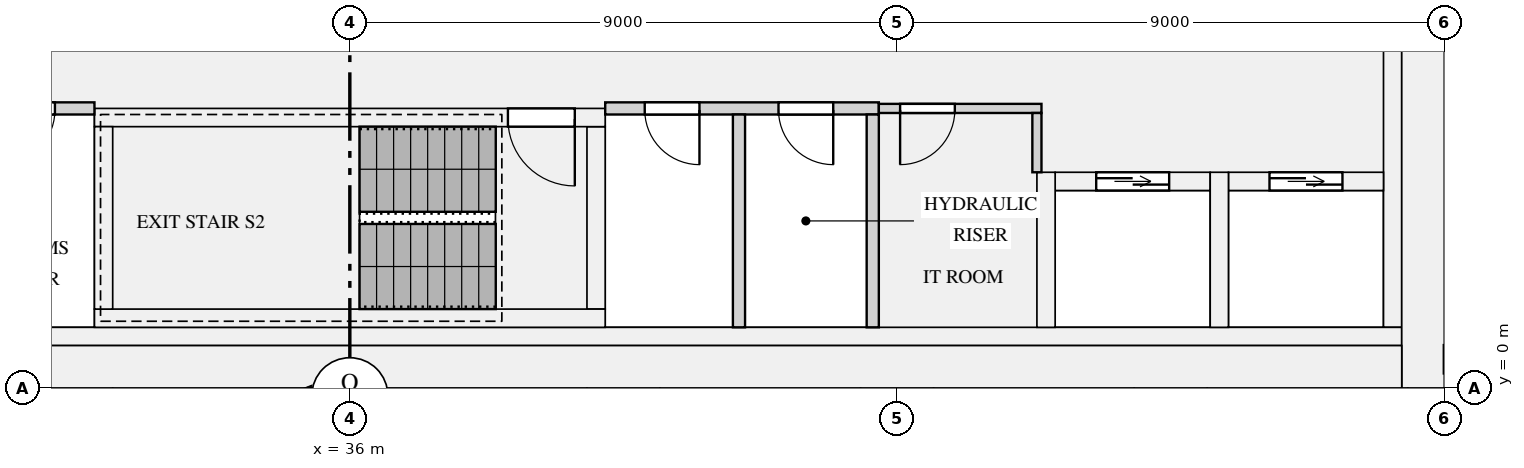
"""IFC4 building model, lengths in metres.
Left out: names, types, materials, properties, quantities, classifications, styles, units other than length and angle.
Written with IfcOpenShell. Run it as: python <this file> out.ifc"""

import sys

from ifc_helpers import new_model, si_unit, direction, frame, frame_2d, origin, place, context, subcontext, project, spatial, rectangle, extrude, element, fill, save


model = new_model("IFC4")
c1 = context("Model", 3, precision=1e-05, world=origin(), true_north=direction((0.0, 1.0)))
c2 = subcontext(c1, "Body", "Model", "MODEL_VIEW")
j1 = project(units=[si_unit("LENGTHUNIT", "METRE"), si_unit("PLANEANGLEUNIT", "RADIAN")], contexts=[c1])
p1 = place(None, origin())
s1 = spatial("IfcSite", under=j1, at=p1, CompositionType="ELEMENT")
p2 = place(p1, origin())
s2 = spatial("IfcBuilding", under=s1, at=p2, CompositionType="ELEMENT")
p3 = place(p2, frame((0.0, 0.0, 160.2)))
s3 = spatial("IfcBuildingStorey", under=s2, at=p3, CompositionType="ELEMENT", Elevation=160.2)
p4 = place(p3, frame((53.65, 0.0, 0.0), z_axis=(0.0, 0.0, 1.0), x_axis=(0.0, 1.0, 0.0)))
e1 = element("IfcWall", 1, at=p4, inside=s3, PredefinedType="SHEAR", context=c2, shape_type="SweptSolid", body=[
    extrude(rectangle(XDim=12.5, YDim=0.7, at=frame_2d((6.25, 0.0))), origin(), (0.0, 0.0, 1.0), 3.15),
])
p5 = place(p3, frame((18.7, 0.35, 0.0), z_axis=(0.0, 0.0, 1.0), x_axis=(1.0, 0.0, 0.0)))
e2 = element("IfcWall", 2, at=p5, inside=s3, PredefinedType="SHEAR", context=c2, shape_type="SweptSolid", body=[
    extrude(rectangle(XDim=34.6, YDim=0.7, at=frame_2d((17.3, 0.0))), origin(), (0.0, 0.0, 1.0), 3.15),
])
p6 = place(p3, frame((53.15, 1.0, 0.0), z_axis=(0.0, 0.0, 1.0), x_axis=(0.0, 1.0, 0.0)))
e3 = element("IfcWall", 3, at=p6, inside=s3, PredefinedType="SHEAR", context=c2, shape_type="SweptSolid", body=[
    extrude(rectangle(XDim=10.9, YDim=0.3, at=frame_2d((5.45, 0.0))), origin(), (0.0, 0.0, 1.0), 3.15),
])
p7 = place(p3, frame((18.7, 0.85, 0.0), z_axis=(0.0, 0.0, 1.0), x_axis=(1.0, 0.0, 0.0)))
e4 = element("IfcWall", 4, at=p7, inside=s3, PredefinedType="SHEAR", context=c2, shape_type="SweptSolid", body=[
    extrude(rectangle(XDim=34.6, YDim=0.3, at=frame_2d((17.3, 0.0))), origin(), (0.0, 0.0, 1.0), 3.15),
])
p8 = place(p3, frame((47.6, 3.4, 0.0), z_axis=(0.0, 0.0, 1.0), x_axis=(1.0, 0.0, 0.0)))
e5 = element("IfcWall", 5, at=p8, inside=s3, PredefinedType="SHEAR", context=c2, shape_type="SweptSolid", body=[
    extrude(rectangle(XDim=2.55, YDim=0.3, at=frame_2d((1.275, 0.0))), origin(), (0.0, 0.0, 1.0), 3.15),
])
p9 = place(p8, frame((0.675, 0.0, 0.0)))
e6 = element("IfcOpeningElement", 6, at=p9, cuts=e5, PredefinedType="OPENING", context=c2, shape_type="SweptSolid", body=[
    extrude(rectangle(XDim=1.2, YDim=2.1, at=frame_2d((0.6, 1.05))), frame((0.0, 0.16, 0.0), z_axis=(0.0, -1.0, 0.0), x_axis=(1.0, 0.0, 0.0)), (0.0, 0.0, 1.0), 0.32),
])
p10 = place(p3, frame((47.45, 1.0, 0.0), z_axis=(0.0, 0.0, 1.0), x_axis=(0.0, 1.0, 0.0)))
e7 = element("IfcWall", 7, at=p10, inside=s3, PredefinedType="SHEAR", context=c2, shape_type="SweptSolid", body=[
    extrude(rectangle(XDim=2.55, YDim=0.3, at=frame_2d((1.275, 0.0))), origin(), (0.0, 0.0, 1.0), 3.15),
])
p11 = place(p3, frame((50.45, 3.4, 0.0), z_axis=(0.0, 0.0, 1.0), x_axis=(1.0, 0.0, 0.0)))
e8 = element("IfcWall", 8, at=p11, inside=s3, PredefinedType="SHEAR", context=c2, shape_type="SweptSolid", body=[
    extrude(rectangle(XDim=2.55, YDim=0.3, at=frame_2d((1.275, 0.0))), origin(), (0.0, 0.0, 1.0), 3.15),
])
p12 = place(p11, frame((0.675, 0.0, 0.0)))
e9 = element("IfcOpeningElement", 9, at=p12, cuts=e8, PredefinedType="OPENING", context=c2, shape_type="SweptSolid", body=[
    extrude(rectangle(XDim=1.2, YDim=2.1, at=frame_2d((0.6, 1.05))), frame((0.0, 0.16, 0.0), z_axis=(0.0, -1.0, 0.0), x_axis=(1.0, 0.0, 0.0)), (0.0, 0.0, 1.0), 0.32),
])
p13 = place(p3, frame((50.3, 1.0, 0.0), z_axis=(0.0, 0.0, 1.0), x_axis=(0.0, 1.0, 0.0)))
e10 = element("IfcWall", 10, at=p13, inside=s3, PredefinedType="SHEAR", context=c2, shape_type="SweptSolid", body=[
    extrude(rectangle(XDim=2.55, YDim=0.3, at=frame_2d((1.275, 0.0))), origin(), (0.0, 0.0, 1.0), 3.15),
])
p14 = place(p3, frame((31.8, 1.15, 0.0), z_axis=(0.0, 0.0, 1.0), x_axis=(1.0, 0.0, 0.0)))
e11 = element("IfcWall", 11, at=p14, inside=s3, PredefinedType="SHEAR", context=c2, shape_type="SweptSolid", body=[
    extrude(rectangle(XDim=8.4, YDim=0.3, at=frame_2d((4.2, 0.0))), origin(), (0.0, 0.0, 1.0), 3.15),
])
p15 = place(p3, frame((31.8, 4.45, 0.0), z_axis=(0.0, 0.0, 1.0), x_axis=(1.0, 0.0, 0.0)))
e12 = element("IfcWall", 12, at=p15, inside=s3, PredefinedType="SHEAR", context=c2, shape_type="SweptSolid", body=[
    extrude(rectangle(XDim=8.4, YDim=0.3, at=frame_2d((4.2, 0.0))), origin(), (0.0, 0.0, 1.0), 3.15),
])
p16 = place(p15, frame((6.8, 0.0, 0.0)))
e13 = element("IfcOpeningElement", 13, at=p16, cuts=e12, PredefinedType="OPENING", context=c2, shape_type="SweptSolid", body=[
    extrude(rectangle(XDim=1.1, YDim=2.1, at=frame_2d((0.55, 1.05))), frame((0.0, 0.16, 0.0), z_axis=(0.0, -1.0, 0.0), x_axis=(1.0, 0.0, 0.0)), (0.0, 0.0, 1.0), 0.32),
])
for number, where, z_axis, x_axis in (
    (14, (31.95, 1.3, 0.0), (0.0, 0.0, 1.0), (0.0, 1.0, 0.0)),
    (15, (40.05, 1.3, 0.0), (0.0, 0.0, 1.0), (0.0, 1.0, 0.0)),
):
    element("IfcWall", number, at=place(p3, frame(where, z_axis=z_axis, x_axis=x_axis)), inside=s3, PredefinedType="SHEAR", context=c2, shape_type="SweptSolid", body=[
        extrude(rectangle(XDim=3.0, YDim=0.3, at=frame_2d((1.5, 0.0))), origin(), (0.0, 0.0, 1.0), 3.15),
    ])
p17 = place(p3, frame((27.3, 4.6, 0.0), z_axis=(0.0, 0.0, 1.0), x_axis=(1.0, 0.0, 0.0)))
e16 = element("IfcWall", 16, at=p17, inside=s3, PredefinedType="PARTITIONING", context=c2, shape_type="SweptSolid", body=[
    extrude(rectangle(XDim=4.5, YDim=0.2, at=frame_2d((2.25, 0.0))), origin(), (0.0, 0.0, 1.0), 2.83),
])
p18 = place(p17, frame((0.75, 0.0, 0.0)))
e17 = element("IfcOpeningElement", 17, at=p18, cuts=e16, PredefinedType="OPENING", context=c2, shape_type="SweptSolid", body=[
    extrude(rectangle(XDim=0.9, YDim=2.1, at=frame_2d((0.45, 1.05))), frame((0.0, 0.11, 0.0), z_axis=(0.0, -1.0, 0.0), x_axis=(1.0, 0.0, 0.0)), (0.0, 0.0, 1.0), 0.22),
])
p19 = place(p17, frame((2.95, 0.0, 0.0)))
e18 = element("IfcOpeningElement", 18, at=p19, cuts=e16, PredefinedType="OPENING", context=c2, shape_type="SweptSolid", body=[
    extrude(rectangle(XDim=0.9, YDim=2.1, at=frame_2d((0.45, 1.05))), frame((0.0, 0.11, 0.0), z_axis=(0.0, -1.0, 0.0), x_axis=(1.0, 0.0, 0.0)), (0.0, 0.0, 1.0), 0.22),
])
p20 = place(p3, frame((40.2, 4.6, 0.0), z_axis=(0.0, 0.0, 1.0), x_axis=(1.0, 0.0, 0.0)))
e19 = element("IfcWall", 19, at=p20, inside=s3, PredefinedType="PARTITIONING", context=c2, shape_type="SweptSolid", body=[
    extrude(rectangle(XDim=4.5, YDim=0.2, at=frame_2d((2.25, 0.0))), origin(), (0.0, 0.0, 1.0), 2.83),
])
p21 = place(p20, frame((0.65, 0.0, 0.0)))
e20 = element("IfcOpeningElement", 20, at=p21, cuts=e19, PredefinedType="OPENING", context=c2, shape_type="SweptSolid", body=[
    extrude(rectangle(XDim=0.9, YDim=2.1, at=frame_2d((0.45, 1.05))), frame((0.0, 0.11, 0.0), z_axis=(0.0, -1.0, 0.0), x_axis=(1.0, 0.0, 0.0)), (0.0, 0.0, 1.0), 0.22),
])
p22 = place(p20, frame((2.85, 0.0, 0.0)))
e21 = element("IfcOpeningElement", 21, at=p22, cuts=e19, PredefinedType="OPENING", context=c2, shape_type="SweptSolid", body=[
    extrude(rectangle(XDim=0.9, YDim=2.1, at=frame_2d((0.45, 1.05))), frame((0.0, 0.11, 0.0), z_axis=(0.0, -1.0, 0.0), x_axis=(1.0, 0.0, 0.0)), (0.0, 0.0, 1.0), 0.22),
])
p23 = place(p3, frame((44.7, 4.6, 0.0), z_axis=(0.0, 0.0, 1.0), x_axis=(1.0, 0.0, 0.0)))
e22 = element("IfcWall", 22, at=p23, inside=s3, PredefinedType="PARTITIONING", context=c2, shape_type="SweptSolid", body=[
    extrude(rectangle(XDim=2.675, YDim=0.15, at=frame_2d((1.337, 0.0))), origin(), (0.0, 0.0, 1.0), 2.83),
])
p24 = place(p23, frame((0.35, 0.0, 0.0)))
e23 = element("IfcOpeningElement", 23, at=p24, cuts=e22, PredefinedType="OPENING", context=c2, shape_type="SweptSolid", body=[
    extrude(rectangle(XDim=0.9, YDim=2.1, at=frame_2d((0.45, 1.05))), frame((0.0, 0.085, 0.0), z_axis=(0.0, -1.0, 0.0), x_axis=(1.0, 0.0, 0.0)), (0.0, 0.0, 1.0), 0.17),
])
for number, where, z_axis, x_axis in (
    (24, (42.4, 1.0, 0.0), (0.0, 0.0, 1.0), (0.0, 1.0, 0.0)),
    (25, (44.6, 1.0, 0.0), (0.0, 0.0, 1.0), (0.0, 1.0, 0.0)),
):
    element("IfcWall", number, at=place(p3, frame(where, z_axis=z_axis, x_axis=x_axis)), inside=s3, PredefinedType="PARTITIONING", context=c2, shape_type="SweptSolid", body=[
        extrude(rectangle(XDim=3.5, YDim=0.2, at=frame_2d((1.75, 0.0))), origin(), (0.0, 0.0, 1.0), 2.83),
    ])
p25 = place(p3, frame((47.3, 3.55, 0.0), z_axis=(0.0, 0.0, 1.0), x_axis=(0.0, 1.0, 0.0)))
e26 = element("IfcWall", 26, at=p25, inside=s3, PredefinedType="PARTITIONING", context=c2, shape_type="SweptSolid", body=[
    extrude(rectangle(XDim=0.975, YDim=0.15, at=frame_2d((0.487, 0.0))), origin(), (0.0, 0.0, 1.0), 2.83),
])
p26 = place(p9, origin())
e27 = element("IfcDoor", 27, at=p26, inside=s3, OperationType="DOUBLE_DOOR_SLIDING", PredefinedType="DOOR", context=c2, shape_type="SweptSolid", body=[
    extrude(rectangle(XDim=1.2, YDim=2.1, at=frame_2d((0.6, 1.05))), frame((0.0, 0.025, 0.0), z_axis=(0.0, -1.0, 0.0), x_axis=(1.0, 0.0, 0.0)), (0.0, 0.0, 1.0), 0.05),
])
fill(e6, e27)
p27 = place(p12, origin())
e28 = element("IfcDoor", 28, at=p27, inside=s3, OperationType="DOUBLE_DOOR_SLIDING", PredefinedType="DOOR", context=c2, shape_type="SweptSolid", body=[
    extrude(rectangle(XDim=1.2, YDim=2.1, at=frame_2d((0.6, 1.05))), frame((0.0, 0.025, 0.0), z_axis=(0.0, -1.0, 0.0), x_axis=(1.0, 0.0, 0.0)), (0.0, 0.0, 1.0), 0.05),
])
fill(e9, e28)
p28 = place(p16, frame((1.1, 0.0, 0.0), z_axis=(0.0, 0.0, 1.0), x_axis=(-1.0, 0.0, 0.0)))
e29 = element("IfcDoor", 29, at=p28, inside=s3, OperationType="SINGLE_SWING_LEFT", PredefinedType="DOOR", context=c2, shape_type="SweptSolid", body=[
    extrude(rectangle(XDim=1.1, YDim=2.1, at=frame_2d((0.55, 1.05))), frame((0.0, 0.025, 0.0), z_axis=(0.0, -1.0, 0.0), x_axis=(1.0, 0.0, 0.0)), (0.0, 0.0, 1.0), 0.05),
])
fill(e13, e29)
p29 = place(p24, frame((0.9, 0.0, 0.0), z_axis=(0.0, 0.0, 1.0), x_axis=(-1.0, 0.0, 0.0)))
e30 = element("IfcDoor", 30, at=p29, inside=s3, OperationType="SINGLE_SWING_RIGHT", PredefinedType="DOOR", context=c2, shape_type="SweptSolid", body=[
    extrude(rectangle(XDim=0.9, YDim=2.1, at=frame_2d((0.45, 1.05))), frame((0.0, 0.025, 0.0), z_axis=(0.0, -1.0, 0.0), x_axis=(1.0, 0.0, 0.0)), (0.0, 0.0, 1.0), 0.05),
])
fill(e23, e30)
p30 = place(p19, frame((0.9, 0.0, 0.0), z_axis=(0.0, 0.0, 1.0), x_axis=(-1.0, 0.0, 0.0)))
e31 = element("IfcDoor", 31, at=p30, inside=s3, OperationType="SINGLE_SWING_RIGHT", PredefinedType="DOOR", context=c2, shape_type="SweptSolid", body=[
    extrude(rectangle(XDim=0.9, YDim=2.1, at=frame_2d((0.45, 1.05))), frame((0.0, 0.025, 0.0), z_axis=(0.0, -1.0, 0.0), x_axis=(1.0, 0.0, 0.0)), (0.0, 0.0, 1.0), 0.05),
])
fill(e18, e31)
p31 = place(p21, frame((0.9, 0.0, 0.0), z_axis=(0.0, 0.0, 1.0), x_axis=(-1.0, 0.0, 0.0)))
e32 = element("IfcDoor", 32, at=p31, inside=s3, OperationType="SINGLE_SWING_LEFT", PredefinedType="DOOR", context=c2, shape_type="SweptSolid", body=[
    extrude(rectangle(XDim=0.9, YDim=2.1, at=frame_2d((0.45, 1.05))), frame((0.0, 0.025, 0.0), z_axis=(0.0, -1.0, 0.0), x_axis=(1.0, 0.0, 0.0)), (0.0, 0.0, 1.0), 0.05),
])
fill(e20, e32)
p32 = place(p22, frame((0.9, 0.0, 0.0), z_axis=(0.0, 0.0, 1.0), x_axis=(-1.0, 0.0, 0.0)))
e33 = element("IfcDoor", 33, at=p32, inside=s3, OperationType="SINGLE_SWING_LEFT", PredefinedType="DOOR", context=c2, shape_type="SweptSolid", body=[
    extrude(rectangle(XDim=0.9, YDim=2.1, at=frame_2d((0.45, 1.05))), frame((0.0, 0.025, 0.0), z_axis=(0.0, -1.0, 0.0), x_axis=(1.0, 0.0, 0.0)), (0.0, 0.0, 1.0), 0.05),
])
fill(e21, e33)
save(model, sys.argv[1])
